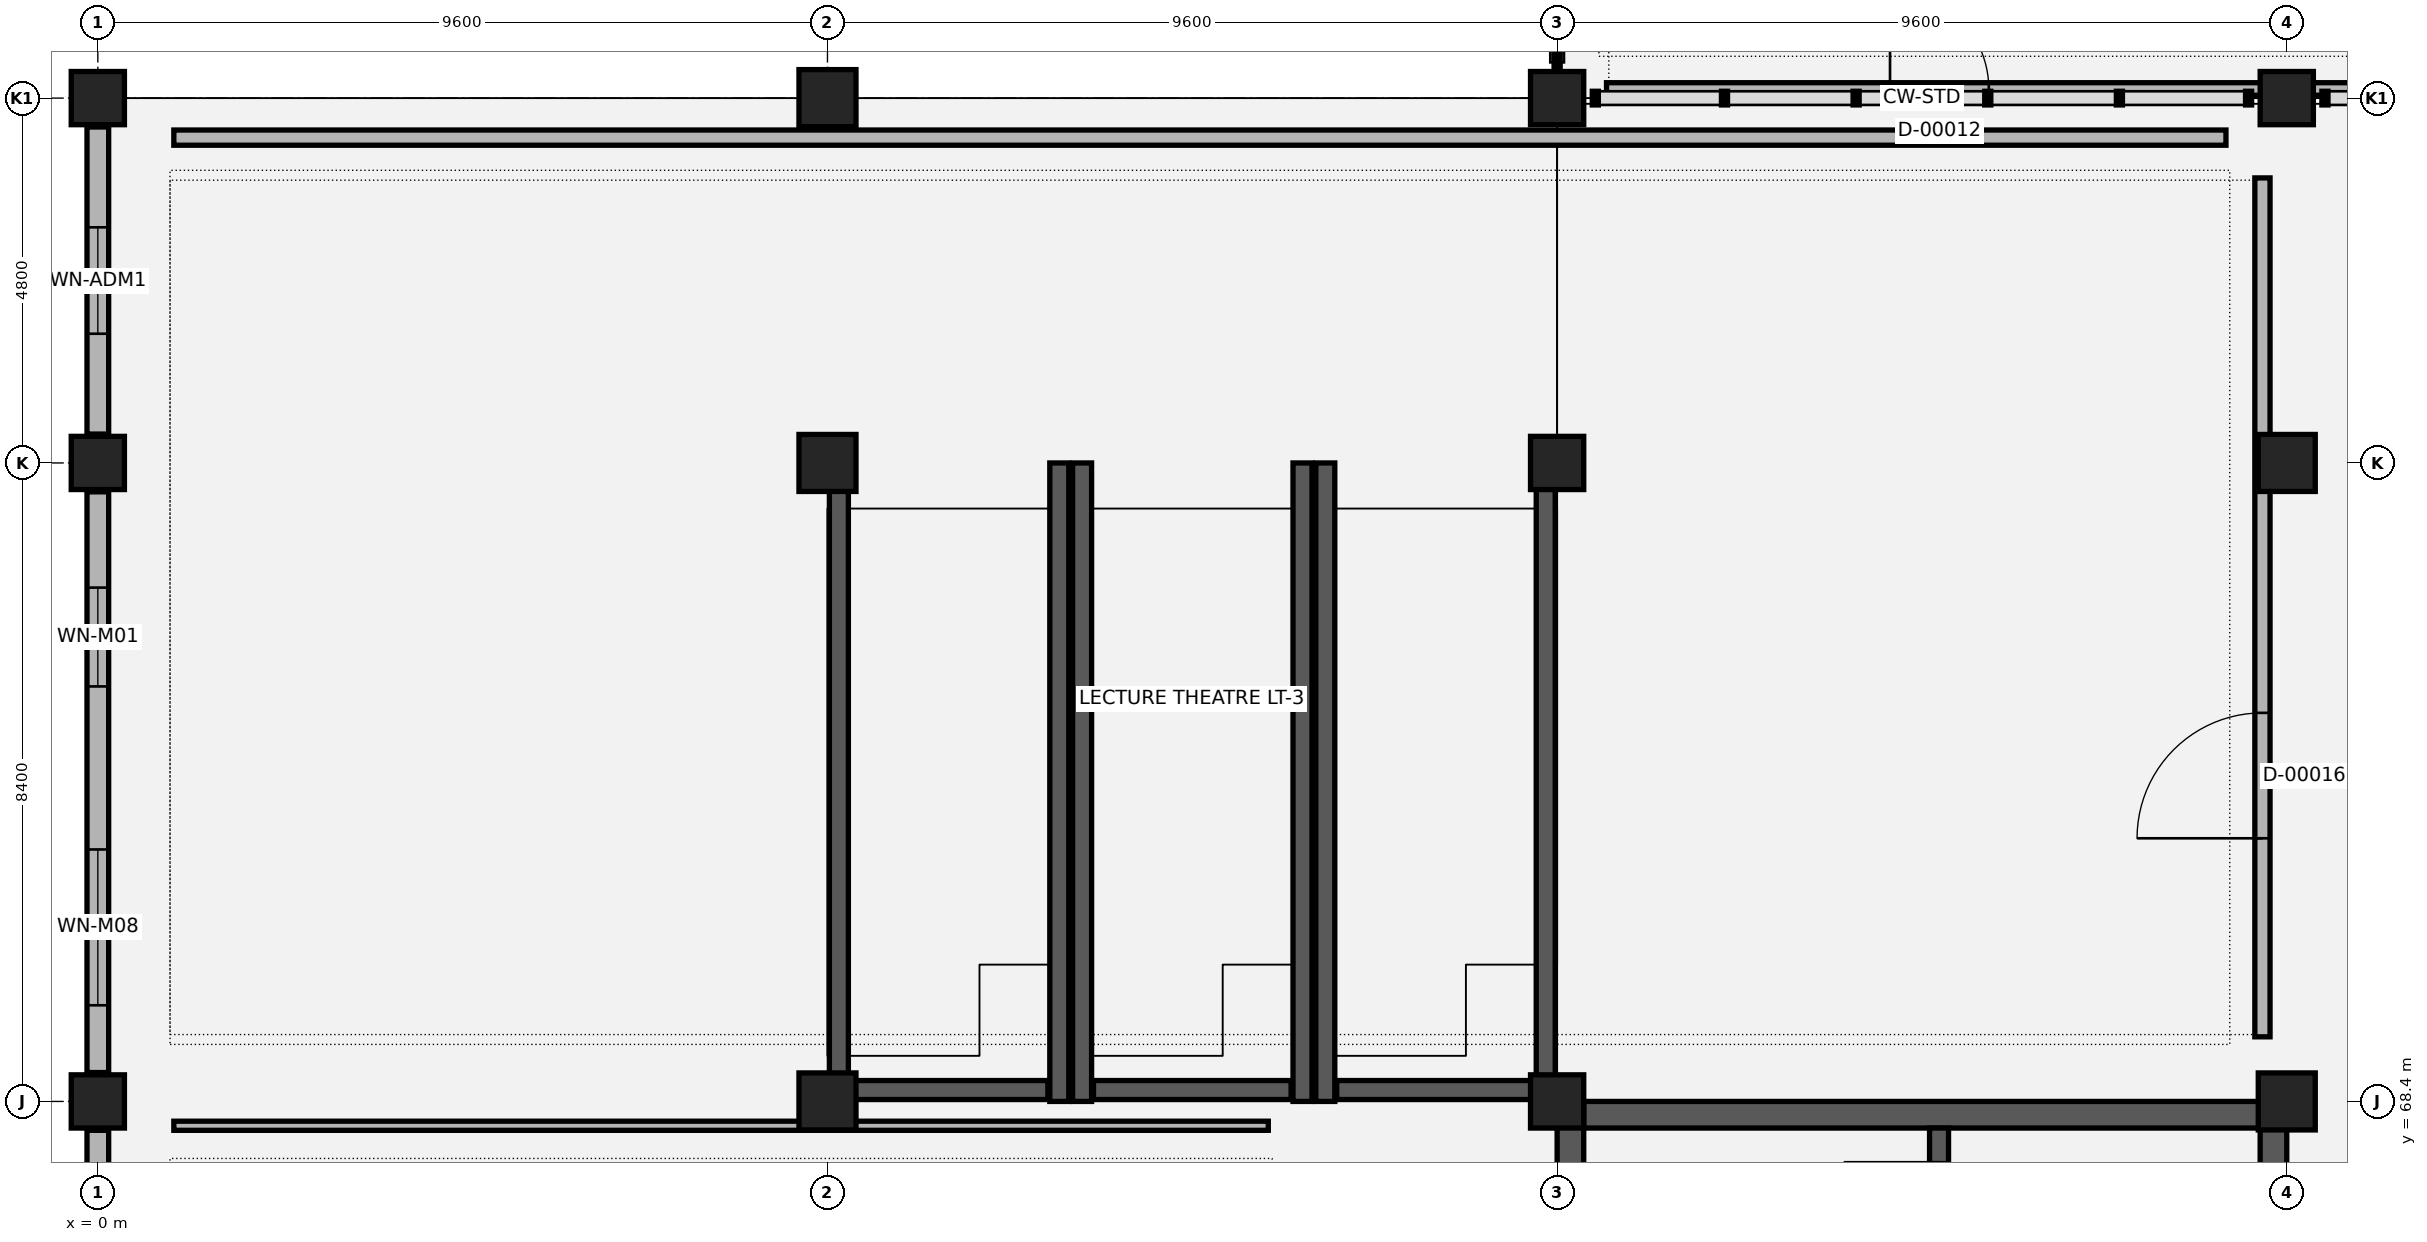
"""IFC4 building model, lengths in metres.
Left out: names, types, materials, properties, quantities, classifications, styles, units other than length and angle.
Written with IfcOpenShell. Run it as: python <this file> out.ifc"""

import sys

from ifc_helpers import new_model, si_unit, direction, frame, frame_2d, origin, origin_2d, place, context, subcontext, project, spatial, rectangle, extrude, element, fill, save


model = new_model("IFC4")
c1 = context("Model", 3, precision=1e-05, world=origin(), true_north=direction((0.0, 1.0)))
c2 = subcontext(c1, "Body", "Model", "MODEL_VIEW")
j1 = project(units=[si_unit("LENGTHUNIT", "METRE"), si_unit("PLANEANGLEUNIT", "RADIAN")], contexts=[c1])
p1 = place(None, origin())
s1 = spatial("IfcSite", under=j1, at=p1, CompositionType="ELEMENT")
p2 = place(p1, origin())
s2 = spatial("IfcBuilding", under=s1, at=p2, CompositionType="ELEMENT")
p3 = place(p2, origin())
s3 = spatial("IfcBuildingStorey", under=s2, at=p3, CompositionType="ELEMENT", Elevation=0.0)
for number, where, z_axis, x_axis in (
    (1, (0.0, 68.4, 0.0), (0.0, 0.0, 1.0), (1.0, 0.0, 0.0)),
    (2, (0.0, 76.8, 0.0), (0.0, 0.0, 1.0), (1.0, 0.0, 0.0)),
    (3, (0.0, 81.6, 0.0), (0.0, 0.0, 1.0), (1.0, 0.0, 0.0)),
):
    element("IfcColumn", number, at=place(p3, frame(where, z_axis=z_axis, x_axis=x_axis)), inside=s3, PredefinedType="COLUMN", context=c2, shape_type="SweptSolid", body=[
        extrude(rectangle(XDim=0.7, YDim=0.7, at=origin_2d()), origin(), (0.0, 0.0, 1.0), 5.4),
    ])
for number, where, z_axis, x_axis in (
    (4, (9.6, 68.4, 0.0), (0.0, 0.0, 1.0), (1.0, 0.0, 0.0)),
    (5, (9.6, 76.8, 0.0), (0.0, 0.0, 1.0), (1.0, 0.0, 0.0)),
    (6, (9.6, 81.6, 0.0), (0.0, 0.0, 1.0), (1.0, 0.0, 0.0)),
):
    element("IfcColumn", number, at=place(p3, frame(where, z_axis=z_axis, x_axis=x_axis)), inside=s3, PredefinedType="COLUMN", context=c2, shape_type="SweptSolid", body=[
        extrude(rectangle(XDim=0.75, YDim=0.75, at=origin_2d()), origin(), (0.0, 0.0, 1.0), 5.4),
    ])
for number, where, z_axis, x_axis in (
    (7, (19.2, 68.4, 0.0), (0.0, 0.0, 1.0), (1.0, 0.0, 0.0)),
    (8, (19.2, 76.8, 0.0), (0.0, 0.0, 1.0), (1.0, 0.0, 0.0)),
    (9, (19.2, 81.6, 0.0), (0.0, 0.0, 1.0), (1.0, 0.0, 0.0)),
):
    element("IfcColumn", number, at=place(p3, frame(where, z_axis=z_axis, x_axis=x_axis)), inside=s3, PredefinedType="COLUMN", context=c2, shape_type="SweptSolid", body=[
        extrude(rectangle(XDim=0.7, YDim=0.7, at=origin_2d()), origin(), (0.0, 0.0, 1.0), 5.4),
    ])
for number, where, z_axis, x_axis in (
    (10, (28.8, 68.4, 0.0), (0.0, 0.0, 1.0), (1.0, 0.0, 0.0)),
    (11, (28.8, 76.8, 0.0), (0.0, 0.0, 1.0), (1.0, 0.0, 0.0)),
):
    element("IfcColumn", number, at=place(p3, frame(where, z_axis=z_axis, x_axis=x_axis)), inside=s3, PredefinedType="COLUMN", context=c2, shape_type="SweptSolid", body=[
        extrude(rectangle(XDim=0.75, YDim=0.75, at=origin_2d()), origin(), (0.0, 0.0, 1.0), 5.4),
    ])
p4 = place(p3, frame((28.8, 81.6, 0.0), z_axis=(0.0, 0.0, 1.0), x_axis=(1.0, 0.0, 0.0)))
e12 = element("IfcColumn", 12, at=p4, inside=s3, PredefinedType="COLUMN", context=c2, shape_type="SweptSolid", body=[
    extrude(rectangle(XDim=0.7, YDim=0.7, at=origin_2d()), origin(), (0.0, 0.0, 1.0), 5.4),
])
for number, where, z_axis, x_axis in (
    (13, (9.75, 68.4, 0.0), (0.0, 0.0, 1.0), (0.0, 1.0, 0.0)),
    (14, (12.65, 68.4, 0.0), (0.0, 0.0, 1.0), (0.0, 1.0, 0.0)),
):
    element("IfcWall", number, at=place(p3, frame(where, z_axis=z_axis, x_axis=x_axis)), inside=s3, PredefinedType="SHEAR", context=c2, shape_type="SweptSolid", body=[
        extrude(rectangle(XDim=8.4, YDim=0.25, at=frame_2d((4.2, 0.0))), origin(), (0.0, 0.0, 1.0), 0.4),
    ])
p5 = place(p3, frame((9.9, 68.55, 0.0), z_axis=(0.0, 0.0, 1.0), x_axis=(1.0, 0.0, 0.0)))
e15 = element("IfcWall", 15, at=p5, inside=s3, PredefinedType="SHEAR", context=c2, shape_type="SweptSolid", body=[
    extrude(rectangle(XDim=2.6, YDim=0.25, at=frame_2d((1.3, 0.0))), origin(), (0.0, 0.0, 1.0), 0.4),
])
for number, where, z_axis, x_axis in (
    (16, (12.95, 68.4, 0.0), (0.0, 0.0, 1.0), (0.0, 1.0, 0.0)),
    (17, (15.85, 68.4, 0.0), (0.0, 0.0, 1.0), (0.0, 1.0, 0.0)),
):
    element("IfcWall", number, at=place(p3, frame(where, z_axis=z_axis, x_axis=x_axis)), inside=s3, PredefinedType="SHEAR", context=c2, shape_type="SweptSolid", body=[
        extrude(rectangle(XDim=8.4, YDim=0.25, at=frame_2d((4.2, 0.0))), origin(), (0.0, 0.0, 1.0), 1.0),
    ])
p6 = place(p3, frame((13.1, 68.55, 0.0), z_axis=(0.0, 0.0, 1.0), x_axis=(1.0, 0.0, 0.0)))
e18 = element("IfcWall", 18, at=p6, inside=s3, PredefinedType="SHEAR", context=c2, shape_type="SweptSolid", body=[
    extrude(rectangle(XDim=2.6, YDim=0.25, at=frame_2d((1.3, 0.0))), origin(), (0.0, 0.0, 1.0), 1.0),
])
for number, where, z_axis, x_axis in (
    (19, (16.15, 68.4, 0.0), (0.0, 0.0, 1.0), (0.0, 1.0, 0.0)),
    (20, (19.05, 68.4, 0.0), (0.0, 0.0, 1.0), (0.0, 1.0, 0.0)),
):
    element("IfcWall", number, at=place(p3, frame(where, z_axis=z_axis, x_axis=x_axis)), inside=s3, PredefinedType="SHEAR", context=c2, shape_type="SweptSolid", body=[
        extrude(rectangle(XDim=8.4, YDim=0.25, at=frame_2d((4.2, 0.0))), origin(), (0.0, 0.0, 1.0), 1.6),
    ])
p7 = place(p3, frame((16.3, 68.55, 0.0), z_axis=(0.0, 0.0, 1.0), x_axis=(1.0, 0.0, 0.0)))
e21 = element("IfcWall", 21, at=p7, inside=s3, PredefinedType="SHEAR", context=c2, shape_type="SweptSolid", body=[
    extrude(rectangle(XDim=2.6, YDim=0.25, at=frame_2d((1.3, 0.0))), origin(), (0.0, 0.0, 1.0), 1.6),
])
p8 = place(p3, frame((0.0, 68.02, 0.0), z_axis=(0.0, 0.0, 1.0), x_axis=(0.0, -1.0, 0.0)))
e22 = element("IfcWall", 22, at=p8, inside=s3, PredefinedType="SOLIDWALL", context=c2, shape_type="SweptSolid", body=[
    extrude(rectangle(XDim=7.64, YDim=0.285, at=frame_2d((3.82, 0.0))), origin(), (0.0, 0.0, 1.0), 4.04),
])
p9 = place(p8, frame((2.82, 0.0, 0.0)))
e23 = element("IfcOpeningElement", 23, at=p9, cuts=e22, PredefinedType="OPENING", context=c2, shape_type="SweptSolid", body=[
    extrude(rectangle(XDim=2.0, YDim=2.2, at=frame_2d((1.0, 1.1))), frame((0.0, 0.152, 0.0), z_axis=(0.0, -1.0, 0.0), x_axis=(1.0, 0.0, 0.0)), (0.0, 0.0, 1.0), 0.305),
])
p10 = place(p3, frame((0.0, 76.42, 0.0), z_axis=(0.0, 0.0, 1.0), x_axis=(0.0, -1.0, 0.0)))
e24 = element("IfcWall", 24, at=p10, inside=s3, PredefinedType="SOLIDWALL", context=c2, shape_type="SweptSolid", body=[
    extrude(rectangle(XDim=7.64, YDim=0.285, at=frame_2d((3.82, 0.0))), origin(), (0.0, 0.0, 1.0), 4.04),
])
p11 = place(p10, frame((1.26, 0.0, 0.9)))
e25 = element("IfcOpeningElement", 25, at=p11, cuts=e24, PredefinedType="OPENING", context=c2, shape_type="SweptSolid", body=[
    extrude(rectangle(XDim=1.3, YDim=1.4, at=frame_2d((0.65, 0.7))), frame((0.0, 0.152, 0.0), z_axis=(0.0, -1.0, 0.0), x_axis=(1.0, 0.0, 0.0)), (0.0, 0.0, 1.0), 0.305),
])
p12 = place(p10, frame((4.705, 0.0, 0.9)))
e26 = element("IfcOpeningElement", 26, at=p12, cuts=e24, PredefinedType="OPENING", context=c2, shape_type="SweptSolid", body=[
    extrude(rectangle(XDim=2.05, YDim=1.6, at=frame_2d((1.025, 0.8))), frame((0.0, 0.152, 0.0), z_axis=(0.0, -1.0, 0.0), x_axis=(1.0, 0.0, 0.0)), (0.0, 0.0, 1.0), 0.305),
])
p13 = place(p3, frame((0.0, 81.22, 0.0), z_axis=(0.0, 0.0, 1.0), x_axis=(0.0, -1.0, 0.0)))
e27 = element("IfcWall", 27, at=p13, inside=s3, PredefinedType="SOLIDWALL", context=c2, shape_type="SweptSolid", body=[
    extrude(rectangle(XDim=4.04, YDim=0.285, at=frame_2d((2.02, 0.0))), origin(), (0.0, 0.0, 1.0), 4.04),
])
p14 = place(p13, frame((1.32, 0.0, 0.9)))
e28 = element("IfcOpeningElement", 28, at=p14, cuts=e27, PredefinedType="OPENING", context=c2, shape_type="SweptSolid", body=[
    extrude(rectangle(XDim=1.4, YDim=1.4, at=frame_2d((0.7, 0.7))), frame((0.0, 0.152, 0.0), z_axis=(0.0, -1.0, 0.0), x_axis=(1.0, 0.0, 0.0)), (0.0, 0.0, 1.0), 0.305),
])
p15 = place(p3, frame((19.2, 68.225, 0.0), z_axis=(0.0, 0.0, 1.0), x_axis=(1.0, 0.0, 0.0)))
e29 = element("IfcWall", 29, at=p15, inside=s3, PredefinedType="SHEAR", context=c2, shape_type="SweptSolid", body=[
    extrude(rectangle(XDim=9.6, YDim=0.35, at=frame_2d((4.8, 0.0))), origin(), (0.0, 0.0, 1.0), 5.11),
])
p16 = place(p3, frame((19.375, 60.0, 0.0), z_axis=(0.0, 0.0, 1.0), x_axis=(0.0, 1.0, 0.0)))
e30 = element("IfcWall", 30, at=p16, inside=s3, PredefinedType="SHEAR", context=c2, shape_type="SweptSolid", body=[
    extrude(rectangle(XDim=8.4, YDim=0.35, at=frame_2d((4.2, 0.0))), origin(), (0.0, 0.0, 1.0), 5.11),
])
p17 = place(p3, frame((28.625, 60.0, 0.0), z_axis=(0.0, 0.0, 1.0), x_axis=(0.0, 1.0, 0.0)))
e31 = element("IfcWall", 31, at=p17, inside=s3, PredefinedType="SHEAR", context=c2, shape_type="SweptSolid", body=[
    extrude(rectangle(XDim=8.4, YDim=0.35, at=frame_2d((4.2, 0.0))), origin(), (0.0, 0.0, 1.0), 5.11),
])
p18 = place(p17, frame((5.3, 0.0, 0.0)))
e32 = element("IfcOpeningElement", 32, at=p18, cuts=e31, PredefinedType="OPENING", context=c2, shape_type="SweptSolid", body=[
    extrude(rectangle(XDim=1.4, YDim=2.15, at=frame_2d((0.7, 1.075))), frame((0.0, 0.185, 0.0), z_axis=(0.0, -1.0, 0.0), x_axis=(1.0, 0.0, 0.0)), (0.0, 0.0, 1.0), 0.37),
])
p19 = place(p3, frame((24.225, 68.05, 0.0), z_axis=(0.0, 0.0, 1.0), x_axis=(0.0, -1.0, 0.0)))
e33 = element("IfcWall", 33, at=p19, inside=s3, PredefinedType="SHEAR", context=c2, shape_type="SweptSolid", body=[
    extrude(rectangle(XDim=7.7, YDim=0.25, at=frame_2d((3.85, 0.0))), origin(), (0.0, 0.0, 1.0), 5.11),
])
p20 = place(p19, frame((0.45, 0.0, 0.0)))
e34 = element("IfcOpeningElement", 34, at=p20, cuts=e33, PredefinedType="OPENING", context=c2, shape_type="SweptSolid", body=[
    extrude(rectangle(XDim=1.25, YDim=2.15, at=frame_2d((0.625, 1.075))), frame((0.0, 0.135, 0.0), z_axis=(0.0, -1.0, 0.0), x_axis=(1.0, 0.0, 0.0)), (0.0, 0.0, 1.0), 0.27),
])
p21 = place(p3, frame((19.85, 81.72, 0.0), z_axis=(0.0, 0.0, 1.0), x_axis=(1.0, 0.0, 0.0)))
e35 = element("IfcWall", 35, at=p21, inside=s3, PredefinedType="PARTITIONING", context=c2, shape_type="SweptSolid", body=[
    extrude(rectangle(XDim=24.3, YDim=0.165, at=frame_2d((12.15, 0.0))), origin(), (0.0, 0.0, 1.0), 4.04),
])
p22 = place(p21, frame((3.73, 0.0, 0.0)))
e36 = element("IfcOpeningElement", 36, at=p22, cuts=e35, PredefinedType="OPENING", context=c2, shape_type="SweptSolid", body=[
    extrude(rectangle(XDim=1.3, YDim=2.15, at=frame_2d((0.65, 1.075))), frame((0.0, 0.093, 0.0), z_axis=(0.0, -1.0, 0.0), x_axis=(1.0, 0.0, 0.0)), (0.0, 0.0, 1.0), 0.185),
])
p23 = place(p3, frame((28.48, 69.25, 0.0), z_axis=(0.0, 0.0, 1.0), x_axis=(0.0, 1.0, 0.0)))
e37 = element("IfcWall", 37, at=p23, inside=s3, PredefinedType="PARTITIONING", context=c2, shape_type="SweptSolid", body=[
    extrude(rectangle(XDim=11.3, YDim=0.2, at=frame_2d((5.65, 0.0))), origin(), (0.0, 0.0, 1.0), 4.04),
])
p24 = place(p23, frame((2.612, 0.0, 0.0)))
e38 = element("IfcOpeningElement", 38, at=p24, cuts=e37, PredefinedType="OPENING", context=c2, shape_type="SweptSolid", body=[
    extrude(rectangle(XDim=1.65, YDim=2.15, at=frame_2d((0.825, 1.075))), frame((0.0, 0.11, 0.0), z_axis=(0.0, -1.0, 0.0), x_axis=(1.0, 0.0, 0.0)), (0.0, 0.0, 1.0), 0.22),
])
p25 = place(p3, frame((1.0, 81.08, 0.0), z_axis=(0.0, 0.0, 1.0), x_axis=(1.0, 0.0, 0.0)))
e39 = element("IfcWall", 39, at=p25, inside=s3, PredefinedType="PARTITIONING", context=c2, shape_type="SweptSolid", body=[
    extrude(rectangle(XDim=27.0, YDim=0.2, at=frame_2d((13.5, 0.0))), origin(), (0.0, 0.0, 1.0), 4.04),
])
p26 = place(p3, frame((1.0, 68.08, 0.0), z_axis=(0.0, 0.0, 1.0), x_axis=(1.0, 0.0, 0.0)))
e40 = element("IfcWall", 40, at=p26, inside=s3, PredefinedType="PARTITIONING", context=c2, shape_type="SweptSolid", body=[
    extrude(rectangle(XDim=14.4, YDim=0.12, at=frame_2d((7.2, 0.0))), origin(), (0.0, 0.0, 1.0), 4.04),
])
p27 = place(p11, origin())
e41 = element("IfcWindow", 41, at=p27, inside=s3, PartitioningType="SINGLE_PANEL", PredefinedType="WINDOW", context=c2, shape_type="SweptSolid", body=[
    extrude(rectangle(XDim=1.3, YDim=1.4, at=frame_2d((0.65, 0.7))), frame((0.0, 0.03, 0.0), z_axis=(0.0, -1.0, 0.0), x_axis=(1.0, 0.0, 0.0)), (0.0, 0.0, 1.0), 0.06),
])
fill(e25, e41)
p28 = place(p12, origin())
e42 = element("IfcWindow", 42, at=p28, inside=s3, PartitioningType="SINGLE_PANEL", PredefinedType="WINDOW", context=c2, shape_type="SweptSolid", body=[
    extrude(rectangle(XDim=2.05, YDim=1.6, at=frame_2d((1.025, 0.8))), frame((0.0, 0.03, 0.0), z_axis=(0.0, -1.0, 0.0), x_axis=(1.0, 0.0, 0.0)), (0.0, 0.0, 1.0), 0.06),
])
fill(e26, e42)
p29 = place(p14, origin())
e43 = element("IfcWindow", 43, at=p29, inside=s3, PartitioningType="SINGLE_PANEL", PredefinedType="WINDOW", context=c2, shape_type="SweptSolid", body=[
    extrude(rectangle(XDim=1.4, YDim=1.4, at=frame_2d((0.7, 0.7))), frame((0.0, 0.03, 0.0), z_axis=(0.0, -1.0, 0.0), x_axis=(1.0, 0.0, 0.0)), (0.0, 0.0, 1.0), 0.06),
])
fill(e28, e43)
p30 = place(p22, origin())
e44 = element("IfcDoor", 44, at=p30, inside=s3, OperationType="SINGLE_SWING_LEFT", PredefinedType="DOOR", context=c2, shape_type="SweptSolid", body=[
    extrude(rectangle(XDim=1.3, YDim=2.15, at=frame_2d((0.65, 1.075))), frame((0.0, 0.025, 0.0), z_axis=(0.0, -1.0, 0.0), x_axis=(1.0, 0.0, 0.0)), (0.0, 0.0, 1.0), 0.05),
])
fill(e36, e44)
p31 = place(p24, origin())
e45 = element("IfcDoor", 45, at=p31, inside=s3, OperationType="SINGLE_SWING_LEFT", PredefinedType="DOOR", context=c2, shape_type="SweptSolid", body=[
    extrude(rectangle(XDim=1.65, YDim=2.15, at=frame_2d((0.825, 1.075))), frame((0.0, 0.025, 0.0), z_axis=(0.0, -1.0, 0.0), x_axis=(1.0, 0.0, 0.0)), (0.0, 0.0, 1.0), 0.05),
])
fill(e38, e45)
save(model, sys.argv[1])
